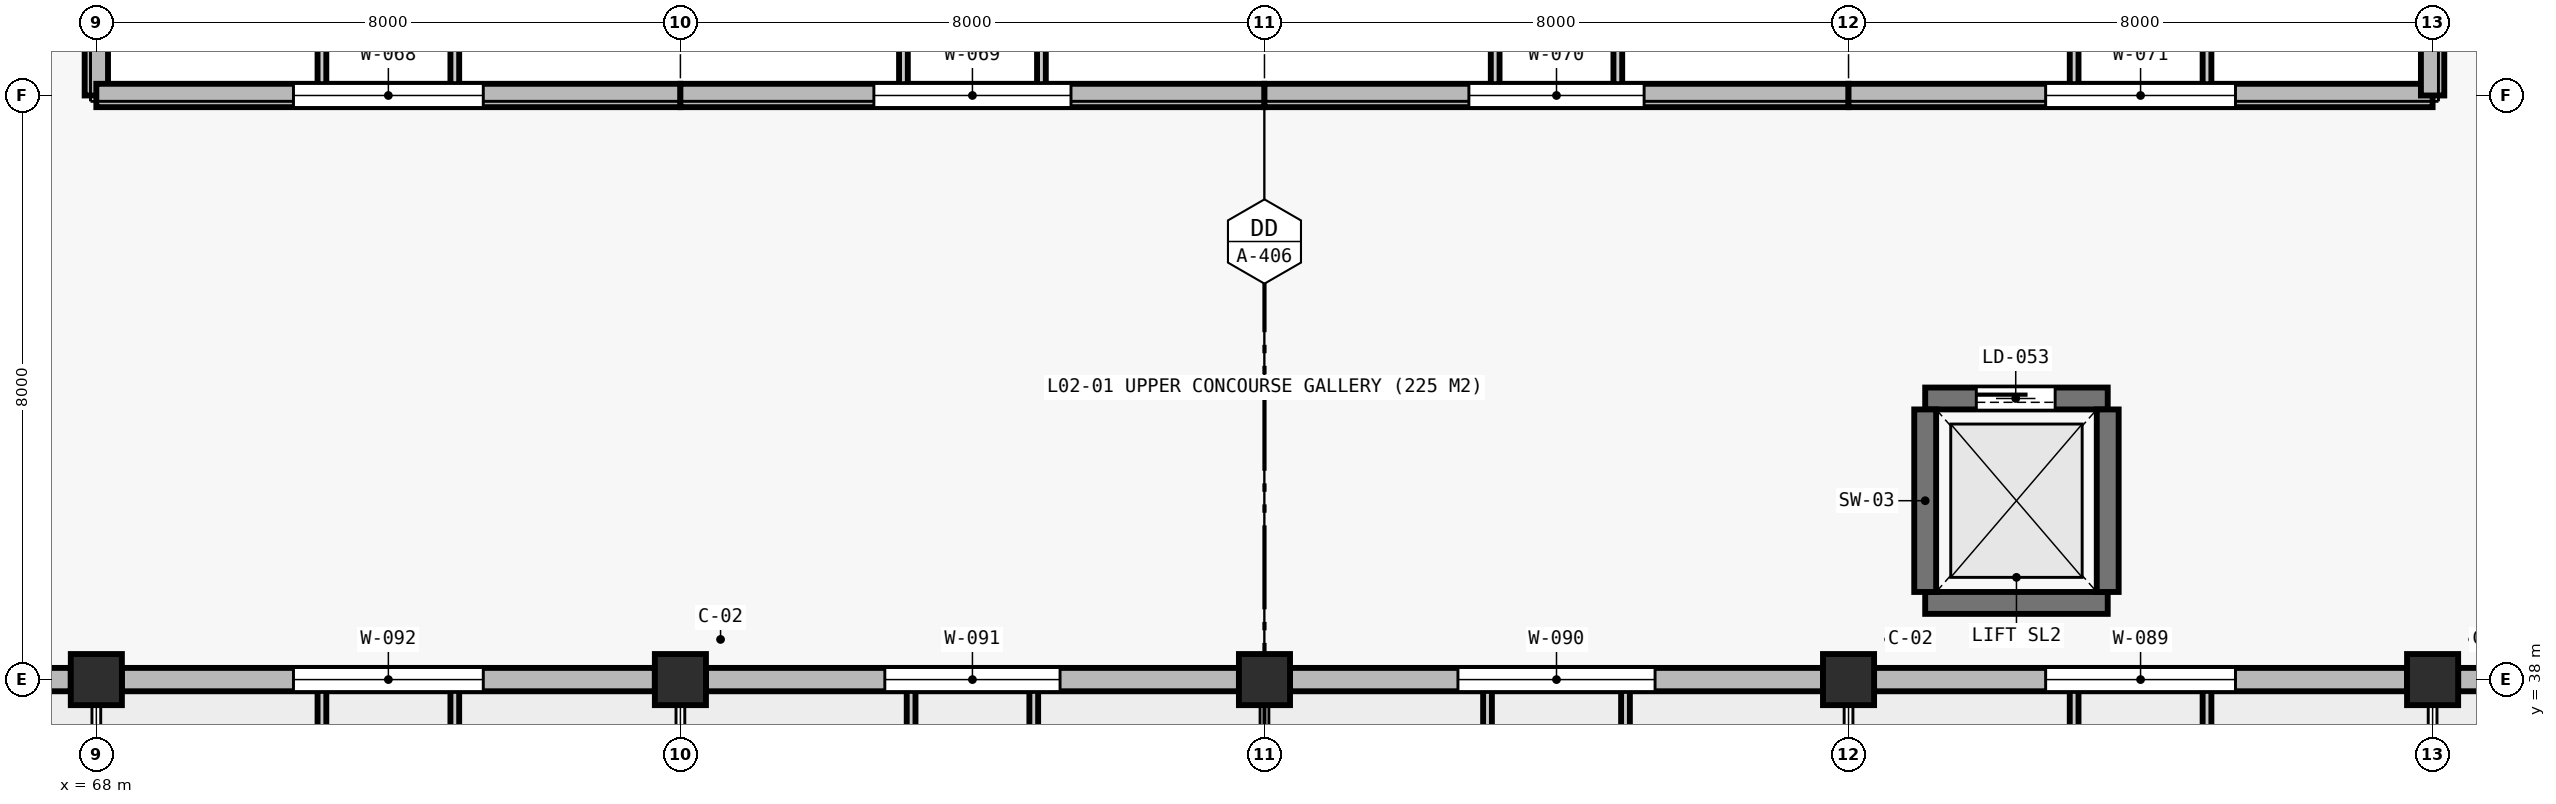
"""IFC4 building model, lengths in metres.
Left out: names, types, materials, properties, quantities, classifications, styles, units other than length and angle.
Written with IfcOpenShell. Run it as: python <this file> out.ifc"""

import sys

from ifc_helpers import new_model, si_unit, direction, frame, frame_2d, origin, origin_2d, place, context, subcontext, project, spatial, rectangle, extrude, element, fill, save


model = new_model("IFC4")
c1 = context("Model", 3, precision=1e-05, world=origin(), true_north=direction((0.0, 1.0)))
c2 = subcontext(c1, "Body", "Model", "MODEL_VIEW")
j1 = project(units=[si_unit("LENGTHUNIT", "METRE"), si_unit("PLANEANGLEUNIT", "RADIAN")], contexts=[c1])
p1 = place(None, origin())
s1 = spatial("IfcSite", under=j1, at=p1, CompositionType="ELEMENT")
p2 = place(p1, origin())
s2 = spatial("IfcBuilding", under=s1, at=p2, CompositionType="ELEMENT")
p3 = place(p2, frame((0.0, 0.0, 11.2)))
s3 = spatial("IfcBuildingStorey", under=s2, at=p3, CompositionType="ELEMENT", Elevation=11.2)
for number, where, z_axis, x_axis in (
    (1, (68.0, 38.0, 0.0), (0.0, 0.0, 1.0), (1.0, 0.0, 0.0)),
    (2, (76.0, 38.0, 0.0), (0.0, 0.0, 1.0), (1.0, 0.0, 0.0)),
    (3, (84.0, 38.0, 0.0), (0.0, 0.0, 1.0), (1.0, 0.0, 0.0)),
    (4, (92.0, 38.0, 0.0), (0.0, 0.0, 1.0), (1.0, 0.0, 0.0)),
    (5, (100.0, 38.0, 0.0), (0.0, 0.0, 1.0), (1.0, 0.0, 0.0)),
):
    element("IfcColumn", number, at=place(p3, frame(where, z_axis=z_axis, x_axis=x_axis)), inside=s3, PredefinedType="COLUMN", context=c2, shape_type="SweptSolid", body=[
        extrude(rectangle(XDim=0.7, YDim=0.7, at=origin_2d()), origin(), (0.0, 0.0, 1.0), 4.0),
    ])
p4 = place(p3, frame((93.05, 41.85, 0.0), z_axis=(0.0, 0.0, 1.0), x_axis=(1.0, 0.0, 0.0)))
e6 = element("IfcWall", 6, at=p4, inside=s3, PredefinedType="SHEAR", context=c2, shape_type="SweptSolid", body=[
    extrude(rectangle(XDim=2.5, YDim=0.3, at=frame_2d((1.25, 0.0))), origin(), (0.0, 0.0, 1.0), 4.0),
])
p5 = place(p4, frame((0.7, 0.0, 0.0)))
e7 = element("IfcOpeningElement", 7, at=p5, cuts=e6, PredefinedType="OPENING", context=c2, shape_type="SweptSolid", body=[
    extrude(rectangle(XDim=1.08, YDim=2.2, at=frame_2d((0.54, 1.1))), frame((0.0, 0.16, 0.0), z_axis=(0.0, -1.0, 0.0), x_axis=(1.0, 0.0, 0.0)), (0.0, 0.0, 1.0), 0.32),
])
for number, where, z_axis, x_axis in (
    (8, (93.05, 39.05, 0.0), (0.0, 0.0, 1.0), (1.0, 0.0, 0.0)),
    (9, (93.05, 39.2, 0.0), (0.0, 0.0, 1.0), (0.0, 1.0, 0.0)),
    (10, (95.55, 39.2, 0.0), (0.0, 0.0, 1.0), (0.0, 1.0, 0.0)),
):
    element("IfcWall", number, at=place(p3, frame(where, z_axis=z_axis, x_axis=x_axis)), inside=s3, PredefinedType="SHEAR", context=c2, shape_type="SweptSolid", body=[
        extrude(rectangle(XDim=2.5, YDim=0.3, at=frame_2d((1.25, 0.0))), origin(), (0.0, 0.0, 1.0), 4.0),
    ])
p6 = place(p3, frame((68.0, 54.0, 0.0), z_axis=(0.0, 0.0, 1.0), x_axis=(0.0, -1.0, 0.0)))
e11 = element("IfcWall", 11, at=p6, inside=s3, PredefinedType="STANDARD", context=c2, shape_type="SweptSolid", body=[
    extrude(rectangle(XDim=8.0, YDim=0.32, at=frame_2d((4.0, 0.0))), origin(), (0.0, 0.0, 1.0), 3.389),
])
p7 = place(p6, frame((2.8, 0.0, 0.95)))
e12 = element("IfcOpeningElement", 12, at=p7, cuts=e11, PredefinedType="OPENING", context=c2, shape_type="SweptSolid", body=[
    extrude(rectangle(XDim=2.4, YDim=1.8, at=frame_2d((1.2, 0.9))), frame((0.0, 0.17, 0.0), z_axis=(0.0, -1.0, 0.0), x_axis=(1.0, 0.0, 0.0)), (0.0, 0.0, 1.0), 0.34),
])
p8 = place(p3, frame((68.0, 46.0, 0.0), z_axis=(0.0, 0.0, 1.0), x_axis=(1.0, 0.0, 0.0)))
e13 = element("IfcWall", 13, at=p8, inside=s3, PredefinedType="STANDARD", context=c2, shape_type="SweptSolid", body=[
    extrude(rectangle(XDim=8.0, YDim=0.32, at=frame_2d((4.0, 0.0))), origin(), (0.0, 0.0, 1.0), 4.0),
])
p9 = place(p8, frame((2.7, 0.0, 0.95)))
e14 = element("IfcOpeningElement", 14, at=p9, cuts=e13, PredefinedType="OPENING", context=c2, shape_type="SweptSolid", body=[
    extrude(rectangle(XDim=2.6, YDim=1.4, at=frame_2d((1.3, 0.7))), frame((0.0, 0.17, 0.0), z_axis=(0.0, -1.0, 0.0), x_axis=(1.0, 0.0, 0.0)), (0.0, 0.0, 1.0), 0.34),
])
p10 = place(p3, frame((76.0, 46.0, 0.0), z_axis=(0.0, 0.0, 1.0), x_axis=(1.0, 0.0, 0.0)))
e15 = element("IfcWall", 15, at=p10, inside=s3, PredefinedType="STANDARD", context=c2, shape_type="SweptSolid", body=[
    extrude(rectangle(XDim=8.0, YDim=0.32, at=frame_2d((4.0, 0.0))), origin(), (0.0, 0.0, 1.0), 4.0),
])
p11 = place(p10, frame((2.65, 0.0, 0.95)))
e16 = element("IfcOpeningElement", 16, at=p11, cuts=e15, PredefinedType="OPENING", context=c2, shape_type="SweptSolid", body=[
    extrude(rectangle(XDim=2.7, YDim=1.95, at=frame_2d((1.35, 0.975))), frame((0.0, 0.17, 0.0), z_axis=(0.0, -1.0, 0.0), x_axis=(1.0, 0.0, 0.0)), (0.0, 0.0, 1.0), 0.34),
])
p12 = place(p3, frame((84.0, 46.0, 0.0), z_axis=(0.0, 0.0, 1.0), x_axis=(1.0, 0.0, 0.0)))
e17 = element("IfcWall", 17, at=p12, inside=s3, PredefinedType="STANDARD", context=c2, shape_type="SweptSolid", body=[
    extrude(rectangle(XDim=8.0, YDim=0.32, at=frame_2d((4.0, 0.0))), origin(), (0.0, 0.0, 1.0), 4.0),
])
p13 = place(p12, frame((2.8, 0.0, 0.95)))
e18 = element("IfcOpeningElement", 18, at=p13, cuts=e17, PredefinedType="OPENING", context=c2, shape_type="SweptSolid", body=[
    extrude(rectangle(XDim=2.4, YDim=1.8, at=frame_2d((1.2, 0.9))), frame((0.0, 0.17, 0.0), z_axis=(0.0, -1.0, 0.0), x_axis=(1.0, 0.0, 0.0)), (0.0, 0.0, 1.0), 0.34),
])
p14 = place(p3, frame((92.0, 46.0, 0.0), z_axis=(0.0, 0.0, 1.0), x_axis=(1.0, 0.0, 0.0)))
e19 = element("IfcWall", 19, at=p14, inside=s3, PredefinedType="STANDARD", context=c2, shape_type="SweptSolid", body=[
    extrude(rectangle(XDim=8.0, YDim=0.32, at=frame_2d((4.0, 0.0))), origin(), (0.0, 0.0, 1.0), 4.0),
])
p15 = place(p14, frame((2.7, 0.0, 0.95)))
e20 = element("IfcOpeningElement", 20, at=p15, cuts=e19, PredefinedType="OPENING", context=c2, shape_type="SweptSolid", body=[
    extrude(rectangle(XDim=2.6, YDim=1.4, at=frame_2d((1.3, 0.7))), frame((0.0, 0.17, 0.0), z_axis=(0.0, -1.0, 0.0), x_axis=(1.0, 0.0, 0.0)), (0.0, 0.0, 1.0), 0.34),
])
p16 = place(p3, frame((100.0, 46.0, 0.0), z_axis=(0.0, 0.0, 1.0), x_axis=(0.0, 1.0, 0.0)))
e21 = element("IfcWall", 21, at=p16, inside=s3, PredefinedType="STANDARD", context=c2, shape_type="SweptSolid", body=[
    extrude(rectangle(XDim=8.0, YDim=0.32, at=frame_2d((4.0, 0.0))), origin(), (0.0, 0.0, 1.0), 3.389),
])
p17 = place(p16, frame((2.65, 0.0, 0.95)))
e22 = element("IfcOpeningElement", 22, at=p17, cuts=e21, PredefinedType="OPENING", context=c2, shape_type="SweptSolid", body=[
    extrude(rectangle(XDim=2.7, YDim=1.95, at=frame_2d((1.35, 0.975))), frame((0.0, 0.17, 0.0), z_axis=(0.0, -1.0, 0.0), x_axis=(1.0, 0.0, 0.0)), (0.0, 0.0, 1.0), 0.34),
])
p18 = place(p3, frame((107.65, 38.0, 0.0), z_axis=(0.0, 0.0, 1.0), x_axis=(-1.0, 0.0, 0.0)))
e23 = element("IfcWall", 23, at=p18, inside=s3, PredefinedType="STANDARD", context=c2, shape_type="SweptSolid", body=[
    extrude(rectangle(XDim=7.3, YDim=0.32, at=frame_2d((3.65, 0.0))), origin(), (0.0, 0.0, 1.0), 3.23),
])
p19 = place(p18, frame((2.45, 0.0, 0.95)))
e24 = element("IfcOpeningElement", 24, at=p19, cuts=e23, PredefinedType="OPENING", context=c2, shape_type="SweptSolid", body=[
    extrude(rectangle(XDim=2.4, YDim=1.8, at=frame_2d((1.2, 0.9))), frame((0.0, 0.17, 0.0), z_axis=(0.0, -1.0, 0.0), x_axis=(1.0, 0.0, 0.0)), (0.0, 0.0, 1.0), 0.34),
])
p20 = place(p3, frame((99.65, 38.0, 0.0), z_axis=(0.0, 0.0, 1.0), x_axis=(-1.0, 0.0, 0.0)))
e25 = element("IfcWall", 25, at=p20, inside=s3, PredefinedType="STANDARD", context=c2, shape_type="SweptSolid", body=[
    extrude(rectangle(XDim=7.3, YDim=0.32, at=frame_2d((3.65, 0.0))), origin(), (0.0, 0.0, 1.0), 3.23),
])
p21 = place(p20, frame((2.35, 0.0, 0.95)))
e26 = element("IfcOpeningElement", 26, at=p21, cuts=e25, PredefinedType="OPENING", context=c2, shape_type="SweptSolid", body=[
    extrude(rectangle(XDim=2.6, YDim=1.4, at=frame_2d((1.3, 0.7))), frame((0.0, 0.17, 0.0), z_axis=(0.0, -1.0, 0.0), x_axis=(1.0, 0.0, 0.0)), (0.0, 0.0, 1.0), 0.34),
])
p22 = place(p3, frame((91.65, 38.0, 0.0), z_axis=(0.0, 0.0, 1.0), x_axis=(-1.0, 0.0, 0.0)))
e27 = element("IfcWall", 27, at=p22, inside=s3, PredefinedType="STANDARD", context=c2, shape_type="SweptSolid", body=[
    extrude(rectangle(XDim=7.3, YDim=0.32, at=frame_2d((3.65, 0.0))), origin(), (0.0, 0.0, 1.0), 3.23),
])
p23 = place(p22, frame((2.3, 0.0, 0.95)))
e28 = element("IfcOpeningElement", 28, at=p23, cuts=e27, PredefinedType="OPENING", context=c2, shape_type="SweptSolid", body=[
    extrude(rectangle(XDim=2.7, YDim=1.95, at=frame_2d((1.35, 0.975))), frame((0.0, 0.17, 0.0), z_axis=(0.0, -1.0, 0.0), x_axis=(1.0, 0.0, 0.0)), (0.0, 0.0, 1.0), 0.34),
])
p24 = place(p3, frame((83.65, 38.0, 0.0), z_axis=(0.0, 0.0, 1.0), x_axis=(-1.0, 0.0, 0.0)))
e29 = element("IfcWall", 29, at=p24, inside=s3, PredefinedType="STANDARD", context=c2, shape_type="SweptSolid", body=[
    extrude(rectangle(XDim=7.3, YDim=0.32, at=frame_2d((3.65, 0.0))), origin(), (0.0, 0.0, 1.0), 3.23),
])
p25 = place(p24, frame((2.45, 0.0, 0.95)))
e30 = element("IfcOpeningElement", 30, at=p25, cuts=e29, PredefinedType="OPENING", context=c2, shape_type="SweptSolid", body=[
    extrude(rectangle(XDim=2.4, YDim=1.8, at=frame_2d((1.2, 0.9))), frame((0.0, 0.17, 0.0), z_axis=(0.0, -1.0, 0.0), x_axis=(1.0, 0.0, 0.0)), (0.0, 0.0, 1.0), 0.34),
])
p26 = place(p3, frame((75.65, 38.0, 0.0), z_axis=(0.0, 0.0, 1.0), x_axis=(-1.0, 0.0, 0.0)))
e31 = element("IfcWall", 31, at=p26, inside=s3, PredefinedType="STANDARD", context=c2, shape_type="SweptSolid", body=[
    extrude(rectangle(XDim=7.3, YDim=0.32, at=frame_2d((3.65, 0.0))), origin(), (0.0, 0.0, 1.0), 3.23),
])
p27 = place(p26, frame((2.35, 0.0, 0.95)))
e32 = element("IfcOpeningElement", 32, at=p27, cuts=e31, PredefinedType="OPENING", context=c2, shape_type="SweptSolid", body=[
    extrude(rectangle(XDim=2.6, YDim=1.4, at=frame_2d((1.3, 0.7))), frame((0.0, 0.17, 0.0), z_axis=(0.0, -1.0, 0.0), x_axis=(1.0, 0.0, 0.0)), (0.0, 0.0, 1.0), 0.34),
])
p28 = place(p3, frame((67.65, 38.0, 0.0), z_axis=(0.0, 0.0, 1.0), x_axis=(-1.0, 0.0, 0.0)))
e33 = element("IfcWall", 33, at=p28, inside=s3, PredefinedType="STANDARD", context=c2, shape_type="SweptSolid", body=[
    extrude(rectangle(XDim=7.3, YDim=0.32, at=frame_2d((3.65, 0.0))), origin(), (0.0, 0.0, 1.0), 3.23),
])
p29 = place(p28, frame((2.3, 0.0, 0.95)))
e34 = element("IfcOpeningElement", 34, at=p29, cuts=e33, PredefinedType="OPENING", context=c2, shape_type="SweptSolid", body=[
    extrude(rectangle(XDim=2.7, YDim=1.95, at=frame_2d((1.35, 0.975))), frame((0.0, 0.17, 0.0), z_axis=(0.0, -1.0, 0.0), x_axis=(1.0, 0.0, 0.0)), (0.0, 0.0, 1.0), 0.34),
])
p30 = place(p9, origin())
e35 = element("IfcWindow", 35, at=p30, inside=s3, PartitioningType="SINGLE_PANEL", PredefinedType="WINDOW", context=c2, shape_type="SweptSolid", body=[
    extrude(rectangle(XDim=2.6, YDim=1.4, at=frame_2d((1.3, 0.7))), frame((0.0, 0.03, 0.0), z_axis=(0.0, -1.0, 0.0), x_axis=(1.0, 0.0, 0.0)), (0.0, 0.0, 1.0), 0.06),
])
fill(e14, e35)
p31 = place(p11, origin())
e36 = element("IfcWindow", 36, at=p31, inside=s3, PartitioningType="SINGLE_PANEL", PredefinedType="WINDOW", context=c2, shape_type="SweptSolid", body=[
    extrude(rectangle(XDim=2.7, YDim=1.95, at=frame_2d((1.35, 0.975))), frame((0.0, 0.03, 0.0), z_axis=(0.0, -1.0, 0.0), x_axis=(1.0, 0.0, 0.0)), (0.0, 0.0, 1.0), 0.06),
])
fill(e16, e36)
p32 = place(p13, origin())
e37 = element("IfcWindow", 37, at=p32, inside=s3, PartitioningType="SINGLE_PANEL", PredefinedType="WINDOW", context=c2, shape_type="SweptSolid", body=[
    extrude(rectangle(XDim=2.4, YDim=1.8, at=frame_2d((1.2, 0.9))), frame((0.0, 0.03, 0.0), z_axis=(0.0, -1.0, 0.0), x_axis=(1.0, 0.0, 0.0)), (0.0, 0.0, 1.0), 0.06),
])
fill(e18, e37)
p33 = place(p15, origin())
e38 = element("IfcWindow", 38, at=p33, inside=s3, PartitioningType="SINGLE_PANEL", PredefinedType="WINDOW", context=c2, shape_type="SweptSolid", body=[
    extrude(rectangle(XDim=2.6, YDim=1.4, at=frame_2d((1.3, 0.7))), frame((0.0, 0.03, 0.0), z_axis=(0.0, -1.0, 0.0), x_axis=(1.0, 0.0, 0.0)), (0.0, 0.0, 1.0), 0.06),
])
fill(e20, e38)
p34 = place(p21, origin())
e39 = element("IfcWindow", 39, at=p34, inside=s3, PartitioningType="SINGLE_PANEL", PredefinedType="WINDOW", context=c2, shape_type="SweptSolid", body=[
    extrude(rectangle(XDim=2.6, YDim=1.4, at=frame_2d((1.3, 0.7))), frame((0.0, 0.03, 0.0), z_axis=(0.0, -1.0, 0.0), x_axis=(1.0, 0.0, 0.0)), (0.0, 0.0, 1.0), 0.06),
])
fill(e26, e39)
p35 = place(p23, origin())
e40 = element("IfcWindow", 40, at=p35, inside=s3, PartitioningType="SINGLE_PANEL", PredefinedType="WINDOW", context=c2, shape_type="SweptSolid", body=[
    extrude(rectangle(XDim=2.7, YDim=1.95, at=frame_2d((1.35, 0.975))), frame((0.0, 0.03, 0.0), z_axis=(0.0, -1.0, 0.0), x_axis=(1.0, 0.0, 0.0)), (0.0, 0.0, 1.0), 0.06),
])
fill(e28, e40)
p36 = place(p25, origin())
e41 = element("IfcWindow", 41, at=p36, inside=s3, PartitioningType="SINGLE_PANEL", PredefinedType="WINDOW", context=c2, shape_type="SweptSolid", body=[
    extrude(rectangle(XDim=2.4, YDim=1.8, at=frame_2d((1.2, 0.9))), frame((0.0, 0.03, 0.0), z_axis=(0.0, -1.0, 0.0), x_axis=(1.0, 0.0, 0.0)), (0.0, 0.0, 1.0), 0.06),
])
fill(e30, e41)
p37 = place(p27, origin())
e42 = element("IfcWindow", 42, at=p37, inside=s3, PartitioningType="SINGLE_PANEL", PredefinedType="WINDOW", context=c2, shape_type="SweptSolid", body=[
    extrude(rectangle(XDim=2.6, YDim=1.4, at=frame_2d((1.3, 0.7))), frame((0.0, 0.03, 0.0), z_axis=(0.0, -1.0, 0.0), x_axis=(1.0, 0.0, 0.0)), (0.0, 0.0, 1.0), 0.06),
])
fill(e32, e42)
p38 = place(p5, origin())
e43 = element("IfcDoor", 43, at=p38, inside=s3, OperationType="SLIDING_TO_LEFT", PredefinedType="DOOR", context=c2, shape_type="SweptSolid", body=[
    extrude(rectangle(XDim=1.08, YDim=2.2, at=frame_2d((0.54, 1.1))), frame((0.0, 0.025, 0.0), z_axis=(0.0, -1.0, 0.0), x_axis=(1.0, 0.0, 0.0)), (0.0, 0.0, 1.0), 0.05),
])
fill(e7, e43)
save(model, sys.argv[1])
